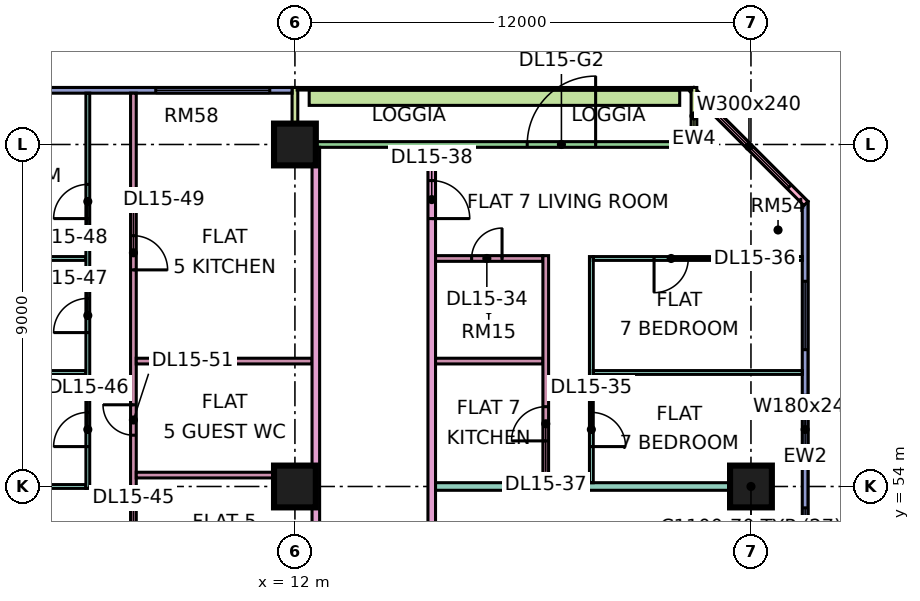
"""IFC4 building model, lengths in metres.
Left out: names, types, materials, properties, quantities, classifications, styles, units other than length and angle.
Written with IfcOpenShell. Run it as: python <this file> out.ifc"""

import sys

from ifc_helpers import new_model, si_unit, direction, frame, frame_2d, origin, origin_2d, place, context, subcontext, project, spatial, rectangle, extrude, element, fill, save


model = new_model("IFC4")
c1 = context("Model", 3, precision=1e-05, world=origin(), true_north=direction((0.0, 1.0)))
c2 = subcontext(c1, "Body", "Model", "MODEL_VIEW")
j1 = project(units=[si_unit("LENGTHUNIT", "METRE"), si_unit("PLANEANGLEUNIT", "RADIAN")], contexts=[c1])
p1 = place(None, origin())
s1 = spatial("IfcSite", under=j1, at=p1, CompositionType="ELEMENT")
p2 = place(p1, origin())
s2 = spatial("IfcBuilding", under=s1, at=p2, CompositionType="ELEMENT")
p3 = place(p2, frame((0.0, 0.0, 71.4)))
s3 = spatial("IfcBuildingStorey", under=s2, at=p3, CompositionType="ELEMENT", Elevation=71.4)
for number, where, z_axis, x_axis in (
    (1, (12.0, 54.0, 0.0), (0.0, 0.0, 1.0), (1.0, 0.0, 0.0)),
    (2, (12.0, 63.0, 0.0), (0.0, 0.0, 1.0), (1.0, 0.0, 0.0)),
    (3, (24.0, 54.0, 0.0), (0.0, 0.0, 1.0), (1.0, 0.0, 0.0)),
):
    element("IfcColumn", number, at=place(p3, frame(where, z_axis=z_axis, x_axis=x_axis)), inside=s3, PredefinedType="COLUMN", context=c2, shape_type="SweptSolid", body=[
        extrude(rectangle(XDim=1.1, YDim=1.1, at=origin_2d()), origin(), (0.0, 0.0, 1.0), 3.75),
    ])
p4 = place(p3, frame((25.425, 48.075, 0.0), z_axis=(0.0, 0.0, 1.0), x_axis=(0.0, 1.0, 0.0)))
e4 = element("IfcWall", 4, at=p4, inside=s3, PredefinedType="SOLIDWALL", context=c2, shape_type="SweptSolid", body=[
    extrude(rectangle(XDim=13.425, YDim=0.15, at=frame_2d((6.712, 0.0))), origin(), (0.0, 0.0, 1.0), 3.35),
])
p5 = place(p4, frame((0.562, 0.0, 0.45)))
e5 = element("IfcOpeningElement", 5, at=p5, cuts=e4, PredefinedType="OPENING", context=c2, shape_type="SweptSolid", body=[
    extrude(rectangle(XDim=4.8, YDim=2.4, at=frame_2d((2.4, 1.2))), frame((0.0, 0.085, 0.0), z_axis=(0.0, -1.0, 0.0), x_axis=(1.0, 0.0, 0.0)), (0.0, 0.0, 1.0), 0.17),
])
p6 = place(p4, frame((6.525, 0.0, 0.45)))
e6 = element("IfcOpeningElement", 6, at=p6, cuts=e4, PredefinedType="OPENING", context=c2, shape_type="SweptSolid", body=[
    extrude(rectangle(XDim=1.8, YDim=2.4, at=frame_2d((0.9, 1.2))), frame((0.0, 0.085, 0.0), z_axis=(0.0, -1.0, 0.0), x_axis=(1.0, 0.0, 0.0)), (0.0, 0.0, 1.0), 0.17),
])
p7 = place(p4, frame((9.525, 0.0, 0.45)))
e7 = element("IfcOpeningElement", 7, at=p7, cuts=e4, PredefinedType="OPENING", context=c2, shape_type="SweptSolid", body=[
    extrude(rectangle(XDim=1.8, YDim=2.4, at=frame_2d((0.9, 1.2))), frame((0.0, 0.085, 0.0), z_axis=(0.0, -1.0, 0.0), x_axis=(1.0, 0.0, 0.0)), (0.0, 0.0, 1.0), 0.17),
])
p8 = place(p3, frame((25.447, 61.447, 0.0), z_axis=(0.0, 0.0, 1.0), x_axis=(-0.707106781187, 0.707106781187, 0.0)))
e8 = element("IfcWall", 8, at=p8, inside=s3, PredefinedType="SOLIDWALL", context=c2, shape_type="SweptSolid", body=[
    extrude(rectangle(XDim=4.243, YDim=0.15, at=frame_2d((2.121, 0.0))), origin(), (0.0, 0.0, 1.0), 3.35),
])
p9 = place(p8, frame((0.621, 0.0, 0.45)))
e9 = element("IfcOpeningElement", 9, at=p9, cuts=e8, PredefinedType="OPENING", context=c2, shape_type="SweptSolid", body=[
    extrude(rectangle(XDim=3.0, YDim=2.4, at=frame_2d((1.5, 1.2))), frame((0.0, 0.085, 0.0), z_axis=(0.0, -1.0, 0.0), x_axis=(1.0, 0.0, 0.0)), (0.0, 0.0, 1.0), 0.17),
])
p10 = place(p3, frame((22.425, 63.0, 0.0), z_axis=(0.0, 0.0, 1.0), x_axis=(-1.0, 0.0, 0.0)))
e10 = element("IfcWall", 10, at=p10, inside=s3, PredefinedType="SOLIDWALL", context=c2, shape_type="SweptSolid", body=[
    extrude(rectangle(XDim=10.35, YDim=0.15, at=frame_2d((5.175, 0.0))), origin(), (0.0, 0.0, 1.0), 3.35),
])
p11 = place(p10, frame((2.512, 0.0, 0.0)))
e11 = element("IfcOpeningElement", 11, at=p11, cuts=e10, PredefinedType="OPENING", context=c2, shape_type="SweptSolid", body=[
    extrude(rectangle(XDim=1.8, YDim=2.4, at=frame_2d((0.9, 1.2))), frame((0.0, 0.085, 0.0), z_axis=(0.0, -1.0, 0.0), x_axis=(1.0, 0.0, 0.0)), (0.0, 0.0, 1.0), 0.17),
])
for number, where, z_axis, x_axis in (
    (12, (22.5, 64.5, 0.0), (0.0, 0.0, 1.0), (0.0, -1.0, 0.0)),
    (13, (12.0, 64.5, 0.0), (0.0, 0.0, 1.0), (0.0, -1.0, 0.0)),
):
    element("IfcWall", number, at=place(p3, frame(where, z_axis=z_axis, x_axis=x_axis)), inside=s3, PredefinedType="SOLIDWALL", context=c2, shape_type="SweptSolid", body=[
        extrude(rectangle(XDim=1.5, YDim=0.15, at=frame_2d((0.75, 0.0))), origin(), (0.0, 0.0, 1.0), 3.35),
    ])
p12 = place(p3, frame((11.925, 64.425, 0.0), z_axis=(0.0, 0.0, 1.0), x_axis=(-1.0, 0.0, 0.0)))
e14 = element("IfcWall", 14, at=p12, inside=s3, PredefinedType="SOLIDWALL", context=c2, shape_type="SweptSolid", body=[
    extrude(rectangle(XDim=10.425, YDim=0.15, at=frame_2d((5.212, 0.0))), origin(), (0.0, 0.0, 1.0), 3.35),
])
p13 = place(p12, frame((0.587, 0.0, 0.45)))
e15 = element("IfcOpeningElement", 15, at=p13, cuts=e14, PredefinedType="OPENING", context=c2, shape_type="SweptSolid", body=[
    extrude(rectangle(XDim=3.0, YDim=2.4, at=frame_2d((1.5, 1.2))), frame((0.0, 0.085, 0.0), z_axis=(0.0, -1.0, 0.0), x_axis=(1.0, 0.0, 0.0)), (0.0, 0.0, 1.0), 0.17),
])
p14 = place(p12, frame((6.4, 0.0, 0.45)))
e16 = element("IfcOpeningElement", 16, at=p14, cuts=e14, PredefinedType="OPENING", context=c2, shape_type="SweptSolid", body=[
    extrude(rectangle(XDim=3.0, YDim=2.4, at=frame_2d((1.5, 1.2))), frame((0.0, 0.085, 0.0), z_axis=(0.0, -1.0, 0.0), x_axis=(1.0, 0.0, 0.0)), (0.0, 0.0, 1.0), 0.17),
])
p15 = place(p3, frame((22.125, 64.229, 0.0), z_axis=(0.0, 0.0, 1.0), x_axis=(-1.0, 0.0, 0.0)))
e17 = element("IfcWall", 17, at=p15, inside=s3, PredefinedType="SOLIDWALL", context=c2, shape_type="SweptSolid", body=[
    extrude(rectangle(XDim=9.75, YDim=0.4, at=frame_2d((4.875, 0.0))), origin(), (0.0, 0.0, 1.0), 0.7),
])
for number, where, z_axis, x_axis in (
    (18, (-1.351, 57.0, 0.0), (0.0, 0.0, 1.0), (1.0, 0.0, 0.0)),
    (19, (-1.351, 60.0, 0.0), (0.0, 0.0, 1.0), (1.0, 0.0, 0.0)),
):
    element("IfcWall", number, at=place(p3, frame(where, z_axis=z_axis, x_axis=x_axis)), inside=s3, PredefinedType="PARTITIONING", context=c2, shape_type="SweptSolid", body=[
        extrude(rectangle(XDim=7.851, YDim=0.1, at=frame_2d((3.926, 0.0))), origin(), (0.0, 0.0, 1.0), 3.35),
    ])
p16 = place(p3, frame((0.0, 54.0, 0.0), z_axis=(0.0, 0.0, 1.0), x_axis=(1.0, 0.0, 0.0)))
e20 = element("IfcWall", 20, at=p16, inside=s3, PredefinedType="PARTITIONING", context=c2, shape_type="SweptSolid", body=[
    extrude(rectangle(XDim=6.5, YDim=0.1, at=frame_2d((3.25, 0.0))), origin(), (0.0, 0.0, 1.0), 3.35),
])
p17 = place(p3, frame((6.55, 53.95, 0.0), z_axis=(0.0, 0.0, 1.0), x_axis=(0.0, 1.0, 0.0)))
e21 = element("IfcWall", 21, at=p17, inside=s3, PredefinedType="PARTITIONING", context=c2, shape_type="SweptSolid", body=[
    extrude(rectangle(XDim=10.4, YDim=0.1, at=frame_2d((5.2, 0.0))), origin(), (0.0, 0.0, 1.0), 3.35),
])
p18 = place(p17, frame((1.1, 0.0, 0.0)))
e22 = element("IfcOpeningElement", 22, at=p18, cuts=e21, PredefinedType="OPENING", context=c2, shape_type="SweptSolid", body=[
    extrude(rectangle(XDim=0.9, YDim=2.1, at=frame_2d((0.45, 1.05))), frame((0.0, 0.06, 0.0), z_axis=(0.0, -1.0, 0.0), x_axis=(1.0, 0.0, 0.0)), (0.0, 0.0, 1.0), 0.12),
])
p19 = place(p17, frame((4.1, 0.0, 0.0)))
e23 = element("IfcOpeningElement", 23, at=p19, cuts=e21, PredefinedType="OPENING", context=c2, shape_type="SweptSolid", body=[
    extrude(rectangle(XDim=0.9, YDim=2.1, at=frame_2d((0.45, 1.05))), frame((0.0, 0.06, 0.0), z_axis=(0.0, -1.0, 0.0), x_axis=(1.0, 0.0, 0.0)), (0.0, 0.0, 1.0), 0.12),
])
p20 = place(p17, frame((7.1, 0.0, 0.0)))
e24 = element("IfcOpeningElement", 24, at=p20, cuts=e21, PredefinedType="OPENING", context=c2, shape_type="SweptSolid", body=[
    extrude(rectangle(XDim=0.9, YDim=2.1, at=frame_2d((0.45, 1.05))), frame((0.0, 0.06, 0.0), z_axis=(0.0, -1.0, 0.0), x_axis=(1.0, 0.0, 0.0)), (0.0, 0.0, 1.0), 0.12),
])
p21 = place(p3, frame((7.75, 50.925, 0.0), z_axis=(0.0, 0.0, 1.0), x_axis=(0.0, 1.0, 0.0)))
e25 = element("IfcWall", 25, at=p21, inside=s3, PredefinedType="PARTITIONING", context=c2, shape_type="SweptSolid", body=[
    extrude(rectangle(XDim=13.425, YDim=0.15, at=frame_2d((6.712, 0.0))), origin(), (0.0, 0.0, 1.0), 3.35),
])
p22 = place(p21, frame((1.275, 0.0, 0.0)))
e26 = element("IfcOpeningElement", 26, at=p22, cuts=e25, PredefinedType="OPENING", context=c2, shape_type="SweptSolid", body=[
    extrude(rectangle(XDim=0.8, YDim=2.1, at=frame_2d((0.4, 1.05))), frame((0.0, 0.085, 0.0), z_axis=(0.0, -1.0, 0.0), x_axis=(1.0, 0.0, 0.0)), (0.0, 0.0, 1.0), 0.17),
])
p23 = place(p21, frame((8.775, 0.0, 0.0)))
e27 = element("IfcOpeningElement", 27, at=p23, cuts=e25, PredefinedType="OPENING", context=c2, shape_type="SweptSolid", body=[
    extrude(rectangle(XDim=0.9, YDim=2.1, at=frame_2d((0.45, 1.05))), frame((0.0, 0.085, 0.0), z_axis=(0.0, -1.0, 0.0), x_axis=(1.0, 0.0, 0.0)), (0.0, 0.0, 1.0), 0.17),
])
p24 = place(p21, frame((4.425, 0.0, 0.0)))
e28 = element("IfcOpeningElement", 28, at=p24, cuts=e25, PredefinedType="OPENING", context=c2, shape_type="SweptSolid", body=[
    extrude(rectangle(XDim=0.8, YDim=2.1, at=frame_2d((0.4, 1.05))), frame((0.0, 0.085, 0.0), z_axis=(0.0, -1.0, 0.0), x_axis=(1.0, 0.0, 0.0)), (0.0, 0.0, 1.0), 0.17),
])
for number, where, z_axis, x_axis in (
    (29, (7.825, 54.3, 0.0), (0.0, 0.0, 1.0), (1.0, 0.0, 0.0)),
    (30, (7.825, 57.3, 0.0), (0.0, 0.0, 1.0), (1.0, 0.0, 0.0)),
):
    element("IfcWall", number, at=place(p3, frame(where, z_axis=z_axis, x_axis=x_axis)), inside=s3, PredefinedType="PARTITIONING", context=c2, shape_type="SweptSolid", body=[
        extrude(rectangle(XDim=4.625, YDim=0.15, at=frame_2d((2.312, 0.0))), origin(), (0.0, 0.0, 1.0), 3.35),
    ])
p25 = place(p3, frame((12.55, 20.0, 0.0), z_axis=(0.0, 0.0, 1.0), x_axis=(0.0, 1.0, 0.0)))
e31 = element("IfcWall", 31, at=p25, inside=s3, PredefinedType="PARTITIONING", context=c2, shape_type="SweptSolid", body=[
    extrude(rectangle(XDim=42.926, YDim=0.2, at=frame_2d((21.463, 0.0))), origin(), (0.0, 0.0, 1.0), 3.35),
])
p26 = place(p25, frame((17.1, 0.0, 0.0)))
e32 = element("IfcOpeningElement", 32, at=p26, cuts=e31, PredefinedType="OPENING", context=c2, shape_type="SweptSolid", body=[
    extrude(rectangle(XDim=1.0, YDim=2.1, at=frame_2d((0.5, 1.05))), frame((0.0, 0.11, 0.0), z_axis=(0.0, -1.0, 0.0), x_axis=(1.0, 0.0, 0.0)), (0.0, 0.0, 1.0), 0.22),
])
p27 = place(p25, frame((28.95, 0.0, 0.0)))
e33 = element("IfcOpeningElement", 33, at=p27, cuts=e31, PredefinedType="OPENING", context=c2, shape_type="SweptSolid", body=[
    extrude(rectangle(XDim=1.0, YDim=2.1, at=frame_2d((0.5, 1.05))), frame((0.0, 0.11, 0.0), z_axis=(0.0, -1.0, 0.0), x_axis=(1.0, 0.0, 0.0)), (0.0, 0.0, 1.0), 0.22),
])
p28 = place(p25, frame((0.6, 0.0, 0.0)))
e34 = element("IfcOpeningElement", 34, at=p28, cuts=e31, PredefinedType="OPENING", context=c2, shape_type="SweptSolid", body=[
    extrude(rectangle(XDim=1.2, YDim=2.1, at=frame_2d((0.6, 1.05))), frame((0.0, 0.11, 0.0), z_axis=(0.0, -1.0, 0.0), x_axis=(1.0, 0.0, 0.0)), (0.0, 0.0, 1.0), 0.22),
])
p29 = place(p25, frame((11.1, 0.0, 0.0)))
e35 = element("IfcOpeningElement", 35, at=p29, cuts=e31, PredefinedType="OPENING", context=c2, shape_type="SweptSolid", body=[
    extrude(rectangle(XDim=1.0, YDim=2.1, at=frame_2d((0.5, 1.05))), frame((0.0, 0.11, 0.0), z_axis=(0.0, -1.0, 0.0), x_axis=(1.0, 0.0, 0.0)), (0.0, 0.0, 1.0), 0.22),
])
p30 = place(p3, frame((15.6, 51.225, 0.0), z_axis=(0.0, 0.0, 1.0), x_axis=(0.0, 1.0, 0.0)))
e36 = element("IfcWall", 36, at=p30, inside=s3, PredefinedType="PARTITIONING", context=c2, shape_type="SweptSolid", body=[
    extrude(rectangle(XDim=11.701, YDim=0.2, at=frame_2d((5.851, 0.0))), origin(), (0.0, 0.0, 1.0), 3.35),
])
p31 = place(p30, frame((9.825, 0.0, 0.0)))
e37 = element("IfcOpeningElement", 37, at=p31, cuts=e36, PredefinedType="OPENING", context=c2, shape_type="SweptSolid", body=[
    extrude(rectangle(XDim=1.0, YDim=2.1, at=frame_2d((0.5, 1.05))), frame((0.0, 0.11, 0.0), z_axis=(0.0, -1.0, 0.0), x_axis=(1.0, 0.0, 0.0)), (0.0, 0.0, 1.0), 0.22),
])
p32 = place(p3, frame((15.7, 54.0, 0.0), z_axis=(0.0, 0.0, 1.0), x_axis=(1.0, 0.0, 0.0)))
e38 = element("IfcWall", 38, at=p32, inside=s3, PredefinedType="PARTITIONING", context=c2, shape_type="SweptSolid", body=[
    extrude(rectangle(XDim=8.3, YDim=0.2, at=frame_2d((4.15, 0.0))), origin(), (0.0, 0.0, 1.0), 3.35),
])
p33 = place(p3, frame((15.7, 57.3, 0.0), z_axis=(0.0, 0.0, 1.0), x_axis=(1.0, 0.0, 0.0)))
e39 = element("IfcWall", 39, at=p33, inside=s3, PredefinedType="PARTITIONING", context=c2, shape_type="SweptSolid", body=[
    extrude(rectangle(XDim=2.825, YDim=0.15, at=frame_2d((1.413, 0.0))), origin(), (0.0, 0.0, 1.0), 3.35),
])
p34 = place(p3, frame((15.7, 60.0, 0.0), z_axis=(0.0, 0.0, 1.0), x_axis=(1.0, 0.0, 0.0)))
e40 = element("IfcWall", 40, at=p34, inside=s3, PredefinedType="PARTITIONING", context=c2, shape_type="SweptSolid", body=[
    extrude(rectangle(XDim=2.825, YDim=0.15, at=frame_2d((1.413, 0.0))), origin(), (0.0, 0.0, 1.0), 3.35),
])
p35 = place(p34, frame((0.95, 0.0, 0.0)))
e41 = element("IfcOpeningElement", 41, at=p35, cuts=e40, PredefinedType="OPENING", context=c2, shape_type="SweptSolid", body=[
    extrude(rectangle(XDim=0.8, YDim=2.1, at=frame_2d((0.4, 1.05))), frame((0.0, 0.085, 0.0), z_axis=(0.0, -1.0, 0.0), x_axis=(1.0, 0.0, 0.0)), (0.0, 0.0, 1.0), 0.17),
])
p36 = place(p3, frame((18.6, 54.1, 0.0), z_axis=(0.0, 0.0, 1.0), x_axis=(0.0, 1.0, 0.0)))
e42 = element("IfcWall", 42, at=p36, inside=s3, PredefinedType="PARTITIONING", context=c2, shape_type="SweptSolid", body=[
    extrude(rectangle(XDim=5.975, YDim=0.15, at=frame_2d((2.987, 0.0))), origin(), (0.0, 0.0, 1.0), 3.35),
])
p37 = place(p36, frame((1.1, 0.0, 0.0)))
e43 = element("IfcOpeningElement", 43, at=p37, cuts=e42, PredefinedType="OPENING", context=c2, shape_type="SweptSolid", body=[
    extrude(rectangle(XDim=0.9, YDim=2.1, at=frame_2d((0.45, 1.05))), frame((0.0, 0.085, 0.0), z_axis=(0.0, -1.0, 0.0), x_axis=(1.0, 0.0, 0.0)), (0.0, 0.0, 1.0), 0.17),
])
p38 = place(p3, frame((19.8, 54.1, 0.0), z_axis=(0.0, 0.0, 1.0), x_axis=(0.0, 1.0, 0.0)))
e44 = element("IfcWall", 44, at=p38, inside=s3, PredefinedType="PARTITIONING", context=c2, shape_type="SweptSolid", body=[
    extrude(rectangle(XDim=5.95, YDim=0.1, at=frame_2d((2.975, 0.0))), origin(), (0.0, 0.0, 1.0), 3.35),
])
p39 = place(p38, frame((0.95, 0.0, 0.0)))
e45 = element("IfcOpeningElement", 45, at=p39, cuts=e44, PredefinedType="OPENING", context=c2, shape_type="SweptSolid", body=[
    extrude(rectangle(XDim=0.9, YDim=2.1, at=frame_2d((0.45, 1.05))), frame((0.0, 0.06, 0.0), z_axis=(0.0, -1.0, 0.0), x_axis=(1.0, 0.0, 0.0)), (0.0, 0.0, 1.0), 0.12),
])
p40 = place(p3, frame((19.85, 57.0, 0.0), z_axis=(0.0, 0.0, 1.0), x_axis=(1.0, 0.0, 0.0)))
e46 = element("IfcWall", 46, at=p40, inside=s3, PredefinedType="PARTITIONING", context=c2, shape_type="SweptSolid", body=[
    extrude(rectangle(XDim=5.501, YDim=0.1, at=frame_2d((2.75, 0.0))), origin(), (0.0, 0.0, 1.0), 3.35),
])
p41 = place(p3, frame((19.85, 60.0, 0.0), z_axis=(0.0, 0.0, 1.0), x_axis=(1.0, 0.0, 0.0)))
e47 = element("IfcWall", 47, at=p41, inside=s3, PredefinedType="PARTITIONING", context=c2, shape_type="SweptSolid", body=[
    extrude(rectangle(XDim=5.5, YDim=0.1, at=frame_2d((2.75, 0.0))), origin(), (0.0, 0.0, 1.0), 3.35),
])
p42 = place(p41, frame((1.6, 0.0, 0.0)))
e48 = element("IfcOpeningElement", 48, at=p42, cuts=e47, PredefinedType="OPENING", context=c2, shape_type="SweptSolid", body=[
    extrude(rectangle(XDim=0.9, YDim=2.1, at=frame_2d((0.45, 1.05))), frame((0.0, 0.06, 0.0), z_axis=(0.0, -1.0, 0.0), x_axis=(1.0, 0.0, 0.0)), (0.0, 0.0, 1.0), 0.12),
])
p43 = place(p5, origin())
e49 = element("IfcWindow", 49, at=p43, inside=s3, PartitioningType="SINGLE_PANEL", PredefinedType="WINDOW", context=c2, shape_type="SweptSolid", body=[
    extrude(rectangle(XDim=4.8, YDim=2.4, at=frame_2d((2.4, 1.2))), frame((0.0, 0.03, 0.0), z_axis=(0.0, -1.0, 0.0), x_axis=(1.0, 0.0, 0.0)), (0.0, 0.0, 1.0), 0.06),
])
fill(e5, e49)
p44 = place(p6, origin())
e50 = element("IfcWindow", 50, at=p44, inside=s3, PartitioningType="SINGLE_PANEL", PredefinedType="WINDOW", context=c2, shape_type="SweptSolid", body=[
    extrude(rectangle(XDim=1.8, YDim=2.4, at=frame_2d((0.9, 1.2))), frame((0.0, 0.03, 0.0), z_axis=(0.0, -1.0, 0.0), x_axis=(1.0, 0.0, 0.0)), (0.0, 0.0, 1.0), 0.06),
])
fill(e6, e50)
p45 = place(p7, origin())
e51 = element("IfcWindow", 51, at=p45, inside=s3, PartitioningType="SINGLE_PANEL", PredefinedType="WINDOW", context=c2, shape_type="SweptSolid", body=[
    extrude(rectangle(XDim=1.8, YDim=2.4, at=frame_2d((0.9, 1.2))), frame((0.0, 0.03, 0.0), z_axis=(0.0, -1.0, 0.0), x_axis=(1.0, 0.0, 0.0)), (0.0, 0.0, 1.0), 0.06),
])
fill(e7, e51)
p46 = place(p9, origin())
e52 = element("IfcWindow", 52, at=p46, inside=s3, PartitioningType="SINGLE_PANEL", PredefinedType="WINDOW", context=c2, shape_type="SweptSolid", body=[
    extrude(rectangle(XDim=3.0, YDim=2.4, at=frame_2d((1.5, 1.2))), frame((0.0, 0.03, 0.0), z_axis=(0.0, -1.0, 0.0), x_axis=(1.0, 0.0, 0.0)), (0.0, 0.0, 1.0), 0.06),
])
fill(e9, e52)
p47 = place(p11, frame((1.8, 0.0, 0.0), z_axis=(0.0, 0.0, 1.0), x_axis=(-1.0, 0.0, 0.0)))
e53 = element("IfcDoor", 53, at=p47, inside=s3, OperationType="DOUBLE_DOOR_SINGLE_SWING", PredefinedType="DOOR", context=c2, shape_type="SweptSolid", body=[
    extrude(rectangle(XDim=1.8, YDim=2.4, at=frame_2d((0.9, 1.2))), frame((0.0, 0.025, 0.0), z_axis=(0.0, -1.0, 0.0), x_axis=(1.0, 0.0, 0.0)), (0.0, 0.0, 1.0), 0.05),
])
fill(e11, e53)
p48 = place(p13, origin())
e54 = element("IfcWindow", 54, at=p48, inside=s3, PartitioningType="SINGLE_PANEL", PredefinedType="WINDOW", context=c2, shape_type="SweptSolid", body=[
    extrude(rectangle(XDim=3.0, YDim=2.4, at=frame_2d((1.5, 1.2))), frame((0.0, 0.03, 0.0), z_axis=(0.0, -1.0, 0.0), x_axis=(1.0, 0.0, 0.0)), (0.0, 0.0, 1.0), 0.06),
])
fill(e15, e54)
p49 = place(p35, frame((0.8, 0.0, 0.0), z_axis=(0.0, 0.0, 1.0), x_axis=(-1.0, 0.0, 0.0)))
e55 = element("IfcDoor", 55, at=p49, inside=s3, OperationType="SINGLE_SWING_RIGHT", PredefinedType="DOOR", context=c2, shape_type="SweptSolid", body=[
    extrude(rectangle(XDim=0.8, YDim=2.1, at=frame_2d((0.4, 1.05))), frame((0.0, 0.025, 0.0), z_axis=(0.0, -1.0, 0.0), x_axis=(1.0, 0.0, 0.0)), (0.0, 0.0, 1.0), 0.05),
])
fill(e41, e55)
p50 = place(p39, frame((0.9, 0.0, 0.0), z_axis=(0.0, 0.0, 1.0), x_axis=(-1.0, 0.0, 0.0)))
e56 = element("IfcDoor", 56, at=p50, inside=s3, OperationType="SINGLE_SWING_LEFT", PredefinedType="DOOR", context=c2, shape_type="SweptSolid", body=[
    extrude(rectangle(XDim=0.9, YDim=2.1, at=frame_2d((0.45, 1.05))), frame((0.0, 0.025, 0.0), z_axis=(0.0, -1.0, 0.0), x_axis=(1.0, 0.0, 0.0)), (0.0, 0.0, 1.0), 0.05),
])
fill(e45, e56)
p51 = place(p42, frame((0.9, 0.0, 0.0), z_axis=(0.0, 0.0, 1.0), x_axis=(-1.0, 0.0, 0.0)))
e57 = element("IfcDoor", 57, at=p51, inside=s3, OperationType="SINGLE_SWING_LEFT", PredefinedType="DOOR", context=c2, shape_type="SweptSolid", body=[
    extrude(rectangle(XDim=0.9, YDim=2.1, at=frame_2d((0.45, 1.05))), frame((0.0, 0.025, 0.0), z_axis=(0.0, -1.0, 0.0), x_axis=(1.0, 0.0, 0.0)), (0.0, 0.0, 1.0), 0.05),
])
fill(e48, e57)
p52 = place(p37, origin())
e58 = element("IfcDoor", 58, at=p52, inside=s3, OperationType="SINGLE_SWING_LEFT", PredefinedType="DOOR", context=c2, shape_type="SweptSolid", body=[
    extrude(rectangle(XDim=0.9, YDim=2.1, at=frame_2d((0.45, 1.05))), frame((0.0, 0.025, 0.0), z_axis=(0.0, -1.0, 0.0), x_axis=(1.0, 0.0, 0.0)), (0.0, 0.0, 1.0), 0.05),
])
fill(e43, e58)
p53 = place(p31, frame((1.0, 0.0, 0.0), z_axis=(0.0, 0.0, 1.0), x_axis=(-1.0, 0.0, 0.0)))
e59 = element("IfcDoor", 59, at=p53, inside=s3, OperationType="SINGLE_SWING_LEFT", PredefinedType="DOOR", context=c2, shape_type="SweptSolid", body=[
    extrude(rectangle(XDim=1.0, YDim=2.1, at=frame_2d((0.5, 1.05))), frame((0.0, 0.025, 0.0), z_axis=(0.0, -1.0, 0.0), x_axis=(1.0, 0.0, 0.0)), (0.0, 0.0, 1.0), 0.05),
])
fill(e37, e59)
p54 = place(p18, origin())
e60 = element("IfcDoor", 60, at=p54, inside=s3, OperationType="SINGLE_SWING_LEFT", PredefinedType="DOOR", context=c2, shape_type="SweptSolid", body=[
    extrude(rectangle(XDim=0.9, YDim=2.1, at=frame_2d((0.45, 1.05))), frame((0.0, 0.025, 0.0), z_axis=(0.0, -1.0, 0.0), x_axis=(1.0, 0.0, 0.0)), (0.0, 0.0, 1.0), 0.05),
])
fill(e22, e60)
p55 = place(p19, origin())
e61 = element("IfcDoor", 61, at=p55, inside=s3, OperationType="SINGLE_SWING_LEFT", PredefinedType="DOOR", context=c2, shape_type="SweptSolid", body=[
    extrude(rectangle(XDim=0.9, YDim=2.1, at=frame_2d((0.45, 1.05))), frame((0.0, 0.025, 0.0), z_axis=(0.0, -1.0, 0.0), x_axis=(1.0, 0.0, 0.0)), (0.0, 0.0, 1.0), 0.05),
])
fill(e23, e61)
p56 = place(p20, origin())
e62 = element("IfcDoor", 62, at=p56, inside=s3, OperationType="SINGLE_SWING_LEFT", PredefinedType="DOOR", context=c2, shape_type="SweptSolid", body=[
    extrude(rectangle(XDim=0.9, YDim=2.1, at=frame_2d((0.45, 1.05))), frame((0.0, 0.025, 0.0), z_axis=(0.0, -1.0, 0.0), x_axis=(1.0, 0.0, 0.0)), (0.0, 0.0, 1.0), 0.05),
])
fill(e24, e62)
p57 = place(p23, frame((0.9, 0.0, 0.0), z_axis=(0.0, 0.0, 1.0), x_axis=(-1.0, 0.0, 0.0)))
e63 = element("IfcDoor", 63, at=p57, inside=s3, OperationType="SINGLE_SWING_LEFT", PredefinedType="DOOR", context=c2, shape_type="SweptSolid", body=[
    extrude(rectangle(XDim=0.9, YDim=2.1, at=frame_2d((0.45, 1.05))), frame((0.0, 0.025, 0.0), z_axis=(0.0, -1.0, 0.0), x_axis=(1.0, 0.0, 0.0)), (0.0, 0.0, 1.0), 0.05),
])
fill(e27, e63)
p58 = place(p24, frame((0.8, 0.0, 0.0), z_axis=(0.0, 0.0, 1.0), x_axis=(-1.0, 0.0, 0.0)))
e64 = element("IfcDoor", 64, at=p58, inside=s3, OperationType="SINGLE_SWING_RIGHT", PredefinedType="DOOR", context=c2, shape_type="SweptSolid", body=[
    extrude(rectangle(XDim=0.8, YDim=2.1, at=frame_2d((0.4, 1.05))), frame((0.0, 0.025, 0.0), z_axis=(0.0, -1.0, 0.0), x_axis=(1.0, 0.0, 0.0)), (0.0, 0.0, 1.0), 0.05),
])
fill(e28, e64)
save(model, sys.argv[1])
